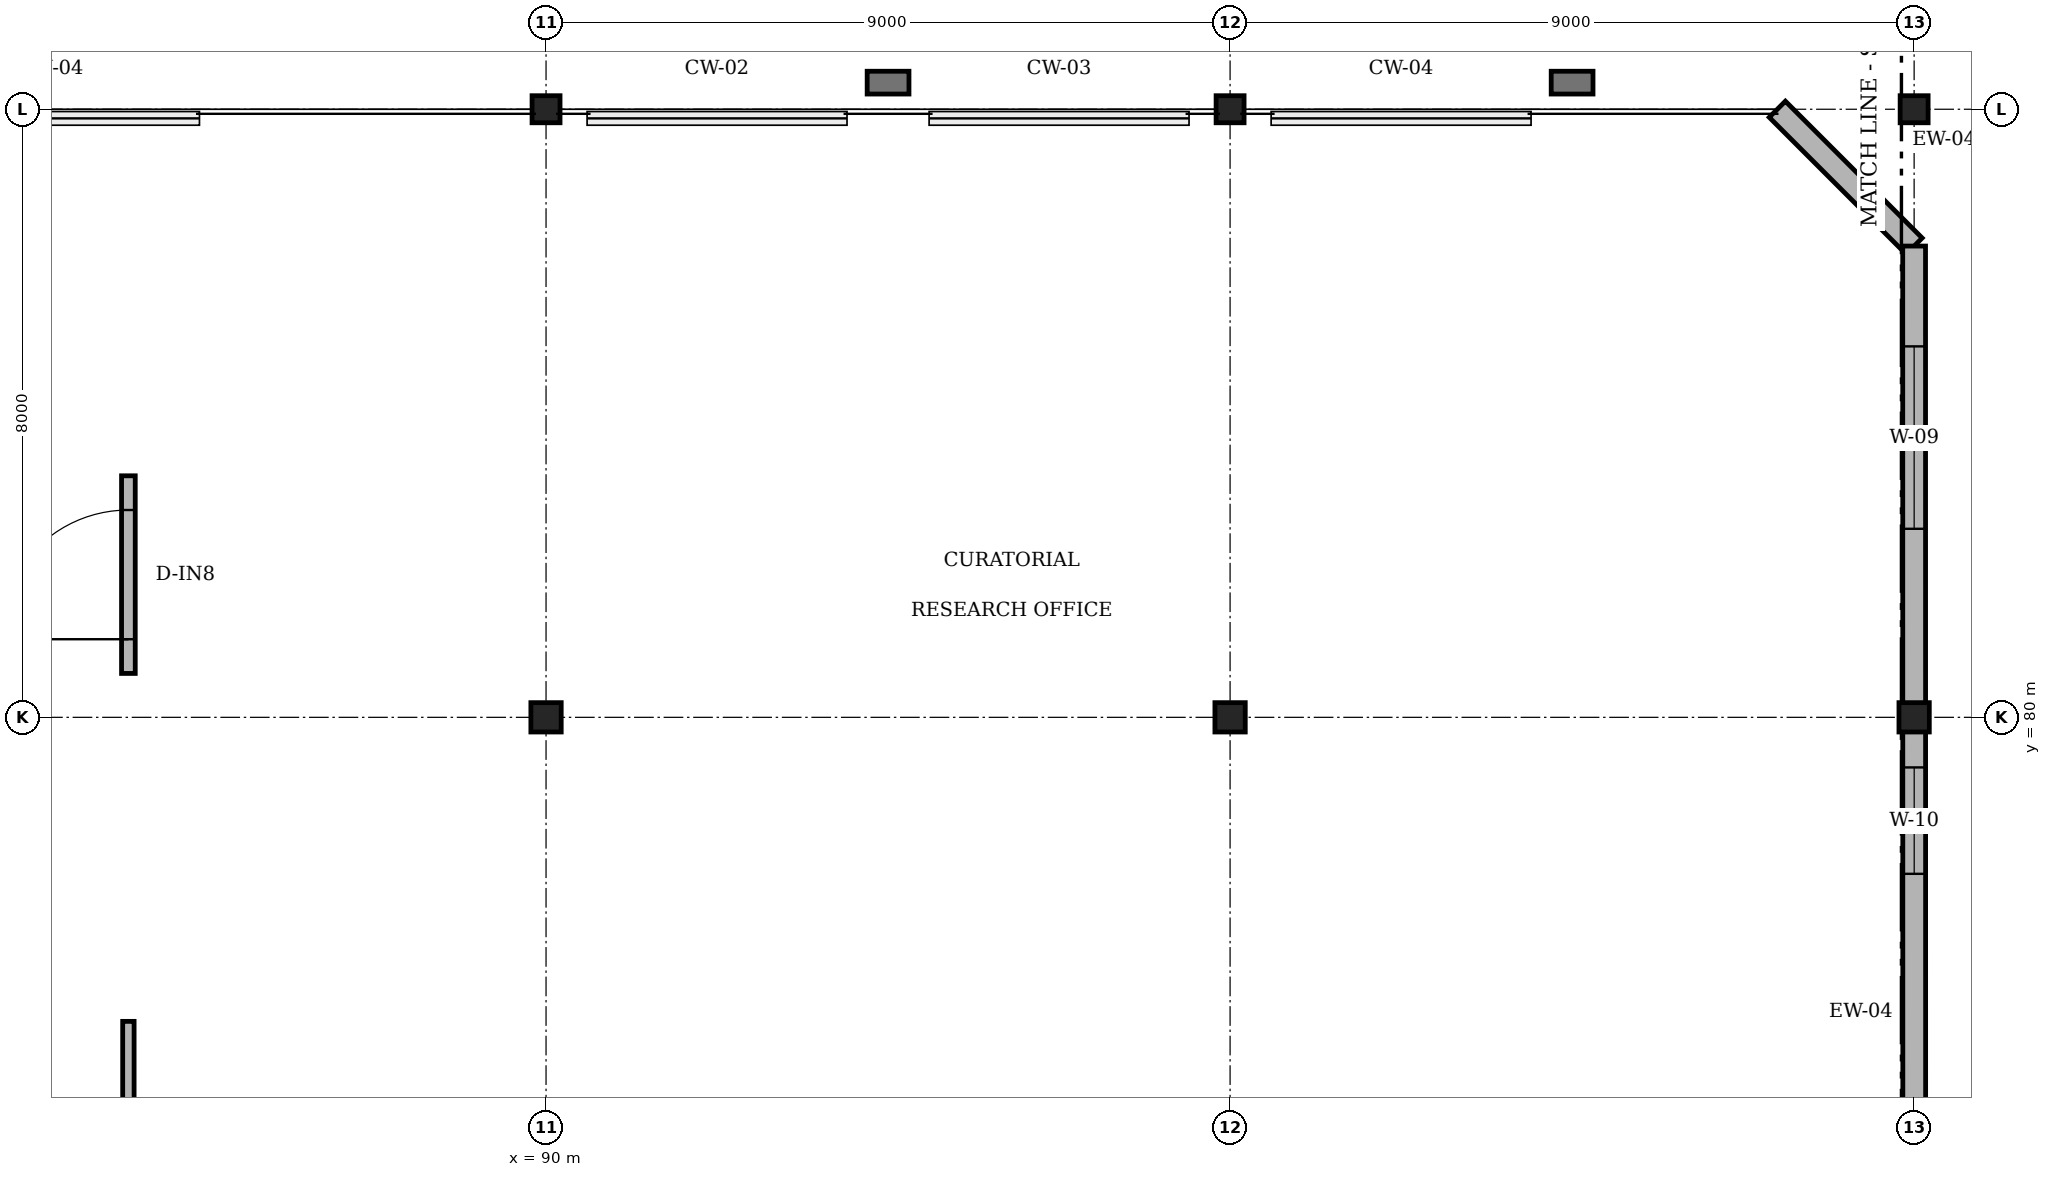
"""IFC4 building model, lengths in metres.
Left out: names, types, materials, properties, quantities, classifications, styles, units other than length and angle.
Written with IfcOpenShell. Run it as: python <this file> out.ifc"""

import sys

from ifc_helpers import new_model, si_unit, direction, frame, frame_2d, origin, origin_2d, place, context, subcontext, project, spatial, rectangle, i_section, extrude, element, fill, save


model = new_model("IFC4")
c1 = context("Model", 3, precision=1e-05, world=origin(), true_north=direction((0.0, 1.0)))
c2 = subcontext(c1, "Body", "Model", "MODEL_VIEW")
j1 = project(units=[si_unit("LENGTHUNIT", "METRE"), si_unit("PLANEANGLEUNIT", "RADIAN")], contexts=[c1])
p1 = place(None, origin())
s1 = spatial("IfcSite", under=j1, at=p1, CompositionType="ELEMENT")
p2 = place(p1, origin())
s2 = spatial("IfcBuilding", under=s1, at=p2, CompositionType="ELEMENT")
p3 = place(p2, frame((0.0, 0.0, 5.4)))
s3 = spatial("IfcBuildingStorey", under=s2, at=p3, CompositionType="ELEMENT", Elevation=5.4)
p4 = place(p3, frame((90.0, 80.0, 0.0), z_axis=(0.0, 0.0, 1.0), x_axis=(1.0, 0.0, 0.0)))
e1 = element("IfcColumn", 1, at=p4, inside=s3, PredefinedType="COLUMN", context=c2, shape_type="SweptSolid", body=[
    extrude(i_section(OverallWidth=0.399, OverallDepth=0.386, WebThickness=0.021, FlangeThickness=0.033, FilletRadius=0.015, at=origin_2d()), origin(), (0.0, 0.0, 1.0), 5.4),
])
p5 = place(p3, frame((90.0, 88.0, 0.0), z_axis=(0.0, 0.0, 1.0), x_axis=(1.0, 0.0, 0.0)))
e2 = element("IfcColumn", 2, at=p5, inside=s3, PredefinedType="COLUMN", context=c2, shape_type="SweptSolid", body=[
    extrude(i_section(OverallWidth=0.368, OverallDepth=0.356, WebThickness=0.011, FlangeThickness=0.018, FilletRadius=0.015, at=origin_2d()), origin(), (0.0, 0.0, 1.0), 5.4),
])
p6 = place(p3, frame((99.0, 80.0, 0.0), z_axis=(0.0, 0.0, 1.0), x_axis=(1.0, 0.0, 0.0)))
e3 = element("IfcColumn", 3, at=p6, inside=s3, PredefinedType="COLUMN", context=c2, shape_type="SweptSolid", body=[
    extrude(i_section(OverallWidth=0.399, OverallDepth=0.386, WebThickness=0.021, FlangeThickness=0.033, FilletRadius=0.015, at=origin_2d()), origin(), (0.0, 0.0, 1.0), 5.4),
])
p7 = place(p3, frame((99.0, 88.0, 0.0), z_axis=(0.0, 0.0, 1.0), x_axis=(1.0, 0.0, 0.0)))
e4 = element("IfcColumn", 4, at=p7, inside=s3, PredefinedType="COLUMN", context=c2, shape_type="SweptSolid", body=[
    extrude(i_section(OverallWidth=0.368, OverallDepth=0.356, WebThickness=0.011, FlangeThickness=0.018, FilletRadius=0.015, at=origin_2d()), origin(), (0.0, 0.0, 1.0), 5.4),
])
p8 = place(p3, frame((108.0, 80.0, 0.0), z_axis=(0.0, 0.0, 1.0), x_axis=(1.0, 0.0, 0.0)))
e5 = element("IfcColumn", 5, at=p8, inside=s3, PredefinedType="COLUMN", context=c2, shape_type="SweptSolid", body=[
    extrude(i_section(OverallWidth=0.399, OverallDepth=0.386, WebThickness=0.021, FlangeThickness=0.033, FilletRadius=0.015, at=origin_2d()), origin(), (0.0, 0.0, 1.0), 5.4),
])
p9 = place(p3, frame((108.0, 88.0, 0.0), z_axis=(0.0, 0.0, 1.0), x_axis=(1.0, 0.0, 0.0)))
e6 = element("IfcColumn", 6, at=p9, inside=s3, PredefinedType="COLUMN", context=c2, shape_type="SweptSolid", body=[
    extrude(i_section(OverallWidth=0.368, OverallDepth=0.356, WebThickness=0.011, FlangeThickness=0.018, FilletRadius=0.015, at=origin_2d()), origin(), (0.0, 0.0, 1.0), 5.4),
])
for number, where, z_axis, x_axis in (
    (7, (94.5, 88.35, 0.0), (0.0, 0.0, 1.0), (1.0, 0.0, 0.0)),
    (8, (103.5, 88.35, 0.0), (0.0, 0.0, 1.0), (1.0, 0.0, 0.0)),
):
    element("IfcColumn", number, at=place(p3, frame(where, z_axis=z_axis, x_axis=x_axis)), inside=s3, PredefinedType="PILASTER", context=c2, shape_type="SweptSolid", body=[
        extrude(rectangle(XDim=0.55, YDim=0.3, at=origin_2d()), origin(), (0.0, 0.0, 1.0), 5.4),
    ])
p10 = place(p3, frame((106.2, 88.0, 0.0), z_axis=(0.0, 0.0, 1.0), x_axis=(0.707106781187, -0.707106781187, 0.0)))
e9 = element("IfcWall", 9, at=p10, inside=s3, PredefinedType="SOLIDWALL", context=c2, shape_type="SweptSolid", body=[
    extrude(rectangle(XDim=2.546, YDim=0.3, at=frame_2d((1.273, 0.0))), origin(), (0.0, 0.0, 1.0), 4.343),
])
p11 = place(p3, frame((108.0, 86.2, 0.0), z_axis=(0.0, 0.0, 1.0), x_axis=(0.000133228364, -0.999999991125, 0.0)))
e10 = element("IfcWall", 10, at=p11, inside=s3, PredefinedType="SOLIDWALL", context=c2, shape_type="SweptSolid", body=[
    extrude(rectangle(XDim=20.157, YDim=0.3, at=frame_2d((10.079, 0.0))), origin(), (0.0, 0.0, 1.0), 4.178),
])
p12 = place(p11, frame((1.32, 0.0, 1.0)))
e11 = element("IfcOpeningElement", 11, at=p12, cuts=e10, PredefinedType="OPENING", context=c2, shape_type="SweptSolid", body=[
    extrude(rectangle(XDim=2.4, YDim=2.2, at=frame_2d((1.2, 1.1))), frame((0.0, 0.16, 0.0), z_axis=(0.0, -1.0, 0.0), x_axis=(1.0, 0.0, 0.0)), (0.0, 0.0, 1.0), 0.32),
])
p13 = place(p11, frame((6.859, 0.0, 1.0)))
e12 = element("IfcOpeningElement", 12, at=p13, cuts=e10, PredefinedType="OPENING", context=c2, shape_type="SweptSolid", body=[
    extrude(rectangle(XDim=1.4, YDim=1.4, at=frame_2d((0.7, 0.7))), frame((0.0, 0.16, 0.0), z_axis=(0.0, -1.0, 0.0), x_axis=(1.0, 0.0, 0.0)), (0.0, 0.0, 1.0), 0.32),
])
p14 = place(p11, frame((11.698, 0.0, 1.0)))
e13 = element("IfcOpeningElement", 13, at=p14, cuts=e10, PredefinedType="OPENING", context=c2, shape_type="SweptSolid", body=[
    extrude(rectangle(XDim=1.8, YDim=1.4, at=frame_2d((0.9, 0.7))), frame((0.0, 0.16, 0.0), z_axis=(0.0, -1.0, 0.0), x_axis=(1.0, 0.0, 0.0)), (0.0, 0.0, 1.0), 0.32),
])
p15 = place(p11, frame((17.188, 0.0, 1.0)))
e14 = element("IfcOpeningElement", 14, at=p15, cuts=e10, PredefinedType="OPENING", context=c2, shape_type="SweptSolid", body=[
    extrude(rectangle(XDim=0.9, YDim=2.1, at=frame_2d((0.45, 1.05))), frame((0.0, 0.16, 0.0), z_axis=(0.0, -1.0, 0.0), x_axis=(1.0, 0.0, 0.0)), (0.0, 0.0, 1.0), 0.32),
])
p16 = place(p3, frame((84.505, 64.0, 0.0), z_axis=(0.0, 0.0, 1.0), x_axis=(0.0, 1.0, 0.0)))
e15 = element("IfcWall", 15, at=p16, inside=s3, PredefinedType="PARTITIONING", context=c2, shape_type="SweptSolid", body=[
    extrude(rectangle(XDim=12.0, YDim=0.15, at=frame_2d((6.0, 0.0))), origin(), (0.0, 0.0, 1.0), 3.15),
])
p17 = place(p16, frame((5.325, 0.0, 0.0)))
e16 = element("IfcOpeningElement", 16, at=p17, cuts=e15, PredefinedType="OPENING", context=c2, shape_type="SweptSolid", body=[
    extrude(rectangle(XDim=1.35, YDim=2.2, at=frame_2d((0.675, 1.1))), frame((0.0, 0.085, 0.0), z_axis=(0.0, -1.0, 0.0), x_axis=(1.0, 0.0, 0.0)), (0.0, 0.0, 1.0), 0.17),
])
p18 = place(p3, frame((84.505, 80.577, 0.0), z_axis=(0.0, 0.0, 1.0), x_axis=(0.0, 1.0, 0.0)))
e17 = element("IfcWall", 17, at=p18, inside=s3, PredefinedType="PARTITIONING", context=c2, shape_type="SweptSolid", body=[
    extrude(rectangle(XDim=2.6, YDim=0.18, at=frame_2d((1.3, 0.0))), origin(), (0.0, 0.0, 1.0), 3.15),
])
p19 = place(p18, frame((0.45, 0.0, 0.0)))
e18 = element("IfcOpeningElement", 18, at=p19, cuts=e17, PredefinedType="OPENING", context=c2, shape_type="SweptSolid", body=[
    extrude(rectangle(XDim=1.7, YDim=2.3, at=frame_2d((0.85, 1.15))), frame((0.0, 0.1, 0.0), z_axis=(0.0, -1.0, 0.0), x_axis=(1.0, 0.0, 0.0)), (0.0, 0.0, 1.0), 0.2),
])
p20 = place(p12, origin())
e19 = element("IfcWindow", 19, at=p20, inside=s3, PartitioningType="SINGLE_PANEL", PredefinedType="WINDOW", context=c2, shape_type="SweptSolid", body=[
    extrude(rectangle(XDim=2.4, YDim=2.2, at=frame_2d((1.2, 1.1))), frame((0.0, 0.03, 0.0), z_axis=(0.0, -1.0, 0.0), x_axis=(1.0, 0.0, 0.0)), (0.0, 0.0, 1.0), 0.06),
])
fill(e11, e19)
p21 = place(p13, origin())
e20 = element("IfcWindow", 20, at=p21, inside=s3, PartitioningType="SINGLE_PANEL", PredefinedType="WINDOW", context=c2, shape_type="SweptSolid", body=[
    extrude(rectangle(XDim=1.4, YDim=1.4, at=frame_2d((0.7, 0.7))), frame((0.0, 0.03, 0.0), z_axis=(0.0, -1.0, 0.0), x_axis=(1.0, 0.0, 0.0)), (0.0, 0.0, 1.0), 0.06),
])
fill(e12, e20)
p22 = place(p19, origin())
e21 = element("IfcDoor", 21, at=p22, inside=s3, OperationType="SINGLE_SWING_LEFT", PredefinedType="DOOR", context=c2, shape_type="SweptSolid", body=[
    extrude(rectangle(XDim=1.7, YDim=2.3, at=frame_2d((0.85, 1.15))), frame((0.0, 0.025, 0.0), z_axis=(0.0, -1.0, 0.0), x_axis=(1.0, 0.0, 0.0)), (0.0, 0.0, 1.0), 0.05),
])
fill(e18, e21)
save(model, sys.argv[1])
